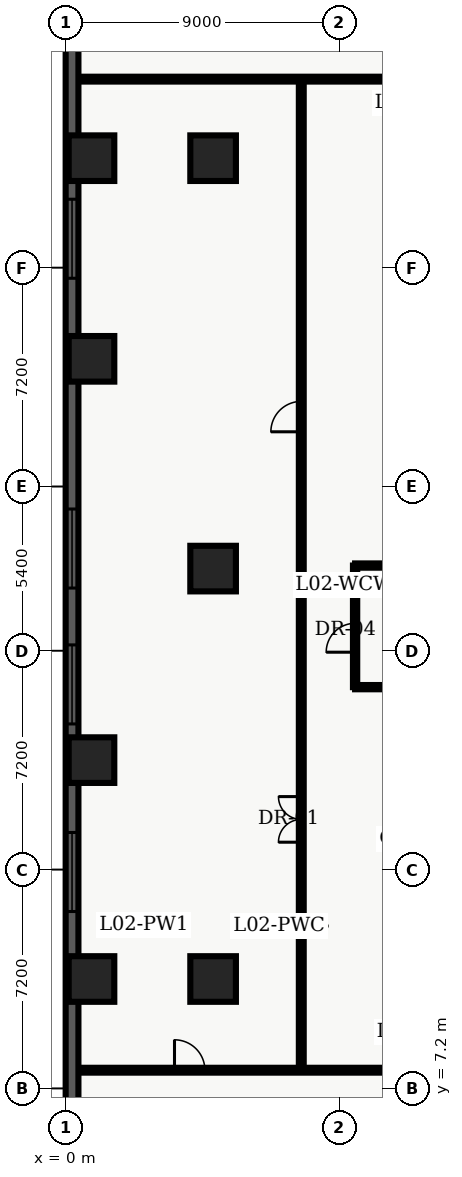
"""IFC4 building model, lengths in metres.
Left out: names, types, materials, properties, quantities, classifications, styles, units other than length and angle.
Written with IfcOpenShell. Run it as: python <this file> out.ifc"""

import sys

from ifc_helpers import new_model, entity, si_unit, converted_unit, direction, frame, origin_with_axes, origin_2d_with_axis, place, context, subcontext, project, spatial, polyline, rectangle, outline, extrude, element, fill, save


model = new_model("IFC4")
c1 = context("Model", 3, precision=1e-05, world=origin_with_axes(), true_north=direction((0.0, 1.0)))
c2 = subcontext(c1, "Body", "Model", "MODEL_VIEW")
j1 = project(units=[si_unit("LENGTHUNIT", "METRE"), converted_unit("PLANEANGLEUNIT", "DEGREE", entity("IfcPlaneAngleMeasure", 0.017), si_unit("PLANEANGLEUNIT", "RADIAN"), dimensions=[0, 0, 0, 0, 0, 0, 0])], contexts=[c1])
p1 = place(None, origin_with_axes())
s1 = spatial("IfcSite", under=j1, at=p1, CompositionType="ELEMENT")
p2 = place(p1, origin_with_axes())
s2 = spatial("IfcBuilding", under=s1, at=p2, CompositionType="ELEMENT")
p3 = place(p2, frame((0.0, 0.0, 10.8), z_axis=(0.0, 0.0, 1.0), x_axis=(1.0, 0.0, 0.0)))
s3 = spatial("IfcBuildingStorey", under=s2, at=p3, CompositionType="ELEMENT", Elevation=10.8)
for number, where, z_axis, x_axis in (
    (1, (4.85, 10.8, 0.0), (0.0, 0.0, 1.0), (1.0, 0.0, 0.0)),
    (2, (4.85, 24.3, 0.0), (0.0, 0.0, 1.0), (1.0, 0.0, 0.0)),
    (3, (4.85, 37.8, 0.0), (0.0, 0.0, 1.0), (1.0, 0.0, 0.0)),
    (4, (0.85, 10.8, 0.0), (0.0, 0.0, 1.0), (1.0, 0.0, 0.0)),
    (5, (0.85, 18.0, 0.0), (0.0, 0.0, 1.0), (1.0, 0.0, 0.0)),
    (6, (0.85, 31.2, 0.0), (0.0, 0.0, 1.0), (1.0, 0.0, 0.0)),
    (7, (0.85, 37.8, 0.0), (0.0, 0.0, 1.0), (1.0, 0.0, 0.0)),
):
    element("IfcColumn", number, at=place(p3, frame(where, z_axis=z_axis, x_axis=x_axis)), inside=s3, PredefinedType="COLUMN", context=c2, shape_type="SweptSolid", body=[
        extrude(rectangle(XDim=1.5, YDim=1.5, at=origin_2d_with_axis()), origin_with_axes(), (0.0, 0.0, 1.0), 4.5),
    ])
p4 = place(p3, frame((9.52, 20.4, 0.0), z_axis=(0.0, 0.0, 1.0), x_axis=(0.0, 1.0, 0.0)))
e8 = element("IfcWall", 8, at=p4, inside=s3, PredefinedType="PARTITIONING", context=c2, shape_type="SweptSolid", body=[
    extrude(outline(polyline([(0.0, -0.07), (4.0, -0.07), (4.0, 0.07), (0.0, 0.07), (0.0, -0.07)])), origin_with_axes(), (0.0, 0.0, 1.0), 3.2),
])
p5 = place(p4, frame((1.625, 0.0, 0.0), z_axis=(0.0, 0.0, 1.0), x_axis=(1.0, 0.0, 0.0)))
e9 = element("IfcOpeningElement", 9, at=p5, cuts=e8, PredefinedType="OPENING", context=c2, shape_type="SweptSolid", body=[
    extrude(rectangle(XDim=0.95, YDim=0.16, at=origin_2d_with_axis()), origin_with_axes(), (0.0, 0.0, 1.0), 2.15),
])
for number, where, z_axis, x_axis in (
    (10, (9.52, 20.4, 0.0), (0.0, 0.0, 1.0), (1.0, 0.0, 0.0)),
    (11, (9.52, 24.4, 0.0), (0.0, 0.0, 1.0), (1.0, 0.0, 0.0)),
):
    element("IfcWall", number, at=place(p3, frame(where, z_axis=z_axis, x_axis=x_axis)), inside=s3, PredefinedType="PARTITIONING", context=c2, shape_type="SweptSolid", body=[
        extrude(outline(polyline([(0.0, -0.07), (1.58, -0.07), (1.58, 0.07), (0.0, 0.07), (0.0, -0.07)])), origin_with_axes(), (0.0, 0.0, 1.0), 3.2),
    ])
p6 = place(p3, frame((0.38, 7.8, 0.0), z_axis=(0.0, 0.0, 1.0), x_axis=(1.0, 0.0, 0.0)))
e12 = element("IfcWall", 12, at=p6, inside=s3, PredefinedType="PARTITIONING", context=c2, shape_type="SweptSolid", body=[
    extrude(outline(polyline([(0.0, -0.08), (20.92, -0.08), (20.92, 0.08), (0.0, 0.08), (0.0, -0.08)])), origin_with_axes(), (0.0, 0.0, 1.0), 3.2),
])
p7 = place(p6, frame((3.7, 0.0, 0.0), z_axis=(0.0, 0.0, 1.0), x_axis=(1.0, 0.0, 0.0)))
e13 = element("IfcOpeningElement", 13, at=p7, cuts=e12, PredefinedType="OPENING", context=c2, shape_type="SweptSolid", body=[
    extrude(rectangle(XDim=1.0, YDim=0.18, at=origin_2d_with_axis()), origin_with_axes(), (0.0, 0.0, 1.0), 2.15),
])
p8 = place(p6, frame((15.3, 0.0, 0.0), z_axis=(0.0, 0.0, 1.0), x_axis=(1.0, 0.0, 0.0)))
e14 = element("IfcOpeningElement", 14, at=p8, cuts=e12, PredefinedType="OPENING", context=c2, shape_type="SweptSolid", body=[
    extrude(rectangle(XDim=1.0, YDim=0.18, at=origin_2d_with_axis()), origin_with_axes(), (0.0, 0.0, 1.0), 2.15),
])
p9 = place(p3, frame((0.38, 40.4, 0.0), z_axis=(0.0, 0.0, 1.0), x_axis=(1.0, 0.0, 0.0)))
e15 = element("IfcWall", 15, at=p9, inside=s3, PredefinedType="PARTITIONING", context=c2, shape_type="SweptSolid", body=[
    extrude(outline(polyline([(0.0, -0.08), (20.92, -0.08), (20.92, 0.08), (0.0, 0.08), (0.0, -0.08)])), origin_with_axes(), (0.0, 0.0, 1.0), 3.2),
])
p10 = place(p9, frame((15.25, 0.0, 0.0), z_axis=(0.0, 0.0, 1.0), x_axis=(1.0, 0.0, 0.0)))
e16 = element("IfcOpeningElement", 16, at=p10, cuts=e15, PredefinedType="OPENING", context=c2, shape_type="SweptSolid", body=[
    extrude(rectangle(XDim=1.5, YDim=0.18, at=origin_2d_with_axis()), origin_with_axes(), (0.0, 0.0, 1.0), 2.2),
])
p11 = place(p3, frame((7.75, 7.8, 0.0), z_axis=(0.0, 0.0, 1.0), x_axis=(0.0, 1.0, 0.0)))
e17 = element("IfcWall", 17, at=p11, inside=s3, PredefinedType="PARTITIONING", context=c2, shape_type="SweptSolid", body=[
    extrude(outline(polyline([(0.0, -0.08), (32.6, -0.08), (32.6, 0.08), (0.0, 0.08), (0.0, -0.08)])), origin_with_axes(), (0.0, 0.0, 1.0), 3.2),
])
p12 = place(p11, frame((8.25, 0.0, 0.0), z_axis=(0.0, 0.0, 1.0), x_axis=(1.0, 0.0, 0.0)))
e18 = element("IfcOpeningElement", 18, at=p12, cuts=e17, PredefinedType="OPENING", context=c2, shape_type="SweptSolid", body=[
    extrude(rectangle(XDim=1.5, YDim=0.18, at=origin_2d_with_axis()), origin_with_axes(), (0.0, 0.0, 1.0), 2.2),
])
p13 = place(p11, frame((21.5, 0.0, 0.0), z_axis=(0.0, 0.0, 1.0), x_axis=(1.0, 0.0, 0.0)))
e19 = element("IfcOpeningElement", 19, at=p13, cuts=e17, PredefinedType="OPENING", context=c2, shape_type="SweptSolid", body=[
    extrude(rectangle(XDim=1.0, YDim=0.18, at=origin_2d_with_axis()), origin_with_axes(), (0.0, 0.0, 1.0), 2.15),
])
p14 = place(p3, frame((0.21, 0.42, 0.0), z_axis=(0.0, 0.0, 1.0), x_axis=(0.0, 1.0, 0.0)))
e20 = element("IfcWall", 20, at=p14, inside=s3, PredefinedType="SOLIDWALL", context=c2, shape_type="SweptSolid", body=[
    extrude(outline(polyline([(0.0, -0.21), (49.08, -0.21), (49.08, 0.21), (0.0, 0.21), (0.0, -0.21)])), origin_with_axes(), (0.0, 0.0, 1.0), 4.26),
])
p15 = place(p14, frame((13.9, 0.0, 0.45), z_axis=(0.0, 0.0, 1.0), x_axis=(1.0, 0.0, 0.0)))
e21 = element("IfcOpeningElement", 21, at=p15, cuts=e20, PredefinedType="OPENING", context=c2, shape_type="SweptSolid", body=[
    extrude(rectangle(XDim=2.6, YDim=0.44, at=origin_2d_with_axis()), origin_with_axes(), (0.0, 0.0, 1.0), 2.8),
])
p16 = place(p14, frame((20.07, 0.0, 0.45), z_axis=(0.0, 0.0, 1.0), x_axis=(1.0, 0.0, 0.0)))
e22 = element("IfcOpeningElement", 22, at=p16, cuts=e20, PredefinedType="OPENING", context=c2, shape_type="SweptSolid", body=[
    extrude(rectangle(XDim=2.6, YDim=0.44, at=origin_2d_with_axis()), origin_with_axes(), (0.0, 0.0, 1.0), 2.8),
])
p17 = place(p14, frame((24.54, 0.0, 0.45), z_axis=(0.0, 0.0, 1.0), x_axis=(1.0, 0.0, 0.0)))
e23 = element("IfcOpeningElement", 23, at=p17, cuts=e20, PredefinedType="OPENING", context=c2, shape_type="SweptSolid", body=[
    extrude(rectangle(XDim=2.6, YDim=0.44, at=origin_2d_with_axis()), origin_with_axes(), (0.0, 0.0, 1.0), 2.8),
])
p18 = place(p14, frame((34.73, 0.0, 0.45), z_axis=(0.0, 0.0, 1.0), x_axis=(1.0, 0.0, 0.0)))
e24 = element("IfcOpeningElement", 24, at=p18, cuts=e20, PredefinedType="OPENING", context=c2, shape_type="SweptSolid", body=[
    extrude(rectangle(XDim=2.6, YDim=0.44, at=origin_2d_with_axis()), origin_with_axes(), (0.0, 0.0, 1.0), 2.8),
])
p19 = place(p4, frame((1.625, 0.0, 0.0), z_axis=(0.0, 0.0, 1.0), x_axis=(1.0, 0.0, 0.0)))
e25 = element("IfcDoor", 25, at=p19, inside=s3, OperationType="SINGLE_SWING_LEFT", PredefinedType="DOOR", context=c2, shape_type="SweptSolid", body=[
    extrude(rectangle(XDim=0.95, YDim=0.084, at=origin_2d_with_axis()), origin_with_axes(), (0.0, 0.0, 1.0), 2.15),
])
fill(e9, e25)
p20 = place(p6, frame((3.7, 0.0, 0.0), z_axis=(0.0, 0.0, 1.0), x_axis=(1.0, 0.0, 0.0)))
e26 = element("IfcDoor", 26, at=p20, inside=s3, OperationType="SINGLE_SWING_LEFT", PredefinedType="DOOR", context=c2, shape_type="SweptSolid", body=[
    extrude(rectangle(XDim=1.0, YDim=0.09, at=origin_2d_with_axis()), origin_with_axes(), (0.0, 0.0, 1.0), 2.15),
])
fill(e13, e26)
p21 = place(p11, frame((8.25, 0.0, 0.0), z_axis=(0.0, 0.0, 1.0), x_axis=(1.0, 0.0, 0.0)))
e27 = element("IfcDoor", 27, at=p21, inside=s3, OperationType="DOUBLE_DOOR_SINGLE_SWING", PredefinedType="DOOR", context=c2, shape_type="SweptSolid", body=[
    extrude(rectangle(XDim=1.5, YDim=0.09, at=origin_2d_with_axis()), origin_with_axes(), (0.0, 0.0, 1.0), 2.2),
])
fill(e18, e27)
p22 = place(p11, frame((21.5, 0.0, 0.0), z_axis=(0.0, 0.0, 1.0), x_axis=(1.0, 0.0, 0.0)))
e28 = element("IfcDoor", 28, at=p22, inside=s3, OperationType="SINGLE_SWING_LEFT", PredefinedType="DOOR", context=c2, shape_type="SweptSolid", body=[
    extrude(rectangle(XDim=1.0, YDim=0.09, at=origin_2d_with_axis()), origin_with_axes(), (0.0, 0.0, 1.0), 2.15),
])
fill(e19, e28)
p23 = place(p14, frame((13.9, 0.0, 0.45), z_axis=(0.0, 0.0, 1.0), x_axis=(1.0, 0.0, 0.0)))
e29 = element("IfcWindow", 29, at=p23, inside=s3, PredefinedType="WINDOW", context=c2, shape_type="SweptSolid", body=[
    extrude(rectangle(XDim=2.6, YDim=0.09, at=origin_2d_with_axis()), origin_with_axes(), (0.0, 0.0, 1.0), 2.8),
])
fill(e21, e29)
p24 = place(p14, frame((20.07, 0.0, 0.45), z_axis=(0.0, 0.0, 1.0), x_axis=(1.0, 0.0, 0.0)))
e30 = element("IfcWindow", 30, at=p24, inside=s3, PredefinedType="WINDOW", context=c2, shape_type="SweptSolid", body=[
    extrude(rectangle(XDim=2.6, YDim=0.09, at=origin_2d_with_axis()), origin_with_axes(), (0.0, 0.0, 1.0), 2.8),
])
fill(e22, e30)
p25 = place(p14, frame((24.54, 0.0, 0.45), z_axis=(0.0, 0.0, 1.0), x_axis=(1.0, 0.0, 0.0)))
e31 = element("IfcWindow", 31, at=p25, inside=s3, PredefinedType="WINDOW", context=c2, shape_type="SweptSolid", body=[
    extrude(rectangle(XDim=2.6, YDim=0.09, at=origin_2d_with_axis()), origin_with_axes(), (0.0, 0.0, 1.0), 2.8),
])
fill(e23, e31)
p26 = place(p14, frame((34.73, 0.0, 0.45), z_axis=(0.0, 0.0, 1.0), x_axis=(1.0, 0.0, 0.0)))
e32 = element("IfcWindow", 32, at=p26, inside=s3, PredefinedType="WINDOW", context=c2, shape_type="SweptSolid", body=[
    extrude(rectangle(XDim=2.6, YDim=0.09, at=origin_2d_with_axis()), origin_with_axes(), (0.0, 0.0, 1.0), 2.8),
])
fill(e24, e32)
save(model, sys.argv[1])
